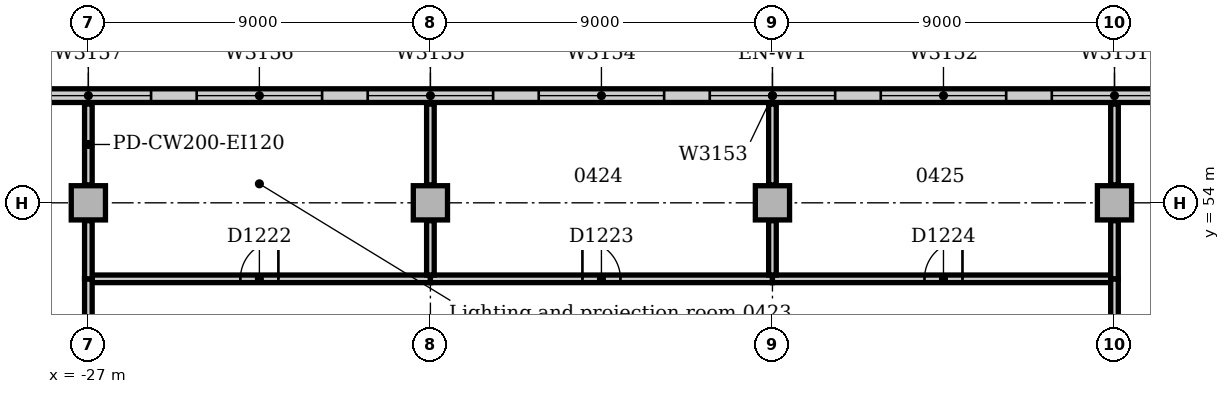
"""IFC4 building model, lengths in metres.
Left out: names, types, materials, properties, quantities, classifications, styles, units other than length and angle.
Written with IfcOpenShell. Run it as: python <this file> out.ifc"""

import sys

from ifc_helpers import new_model, si_unit, direction, frame, frame_2d, origin, origin_2d, place, context, subcontext, project, spatial, rectangle, extrude, element, fill, save


model = new_model("IFC4")
c1 = context("Model", 3, precision=1e-05, world=origin(), true_north=direction((0.0, 1.0)))
c2 = subcontext(c1, "Body", "Model", "MODEL_VIEW")
j1 = project(units=[si_unit("LENGTHUNIT", "METRE"), si_unit("PLANEANGLEUNIT", "RADIAN")], contexts=[c1])
p1 = place(None, origin())
s1 = spatial("IfcSite", under=j1, at=p1, CompositionType="ELEMENT")
p2 = place(p1, origin())
s2 = spatial("IfcBuilding", under=s1, at=p2, CompositionType="ELEMENT")
p3 = place(p2, frame((0.0, 0.0, 21.0)))
s3 = spatial("IfcBuildingStorey", under=s2, at=p3, CompositionType="ELEMENT", Elevation=21.0)
for number, where, z_axis, x_axis in (
    (1, (-27.0, 54.0, 0.0), (0.0, 0.0, 1.0), (1.0, 0.0, 0.0)),
    (2, (-18.0, 54.0, 0.0), (0.0, 0.0, 1.0), (1.0, 0.0, 0.0)),
    (3, (-9.0, 54.0, 0.0), (0.0, 0.0, 1.0), (1.0, 0.0, 0.0)),
    (4, (0.0, 54.0, 0.0), (0.0, 0.0, 1.0), (1.0, 0.0, 0.0)),
):
    element("IfcColumn", number, at=place(p3, frame(where, z_axis=z_axis, x_axis=x_axis)), inside=s3, PredefinedType="COLUMN", context=c2, shape_type="SweptSolid", body=[
        extrude(rectangle(XDim=0.9, YDim=0.9, at=origin_2d()), origin(), (0.0, 0.0, 1.0), 4.7),
    ])
p4 = place(p3, frame((63.0, 56.82, 0.0), z_axis=(0.0, 0.0, 1.0), x_axis=(-1.0, 0.0, 0.0)))
e5 = element("IfcWall", 5, at=p4, inside=s3, PredefinedType="STANDARD", context=c2, shape_type="SweptSolid", body=[
    extrude(rectangle(XDim=144.0, YDim=0.36, at=frame_2d((72.0, 0.0))), origin(), (0.0, 0.0, 1.0), 4.85),
])
p5 = place(p4, frame((2.85, 0.0, 0.9)))
e6 = element("IfcOpeningElement", 6, at=p5, cuts=e5, PredefinedType="OPENING", context=c2, shape_type="SweptSolid", body=[
    extrude(rectangle(XDim=3.3, YDim=2.4, at=frame_2d((1.65, 1.2))), frame((0.0, 0.19, 0.0), z_axis=(0.0, -1.0, 0.0), x_axis=(1.0, 0.0, 0.0)), (0.0, 0.0, 1.0), 0.38),
])
p6 = place(p4, frame((7.35, 0.0, 0.9)))
e7 = element("IfcOpeningElement", 7, at=p6, cuts=e5, PredefinedType="OPENING", context=c2, shape_type="SweptSolid", body=[
    extrude(rectangle(XDim=3.3, YDim=2.4, at=frame_2d((1.65, 1.2))), frame((0.0, 0.19, 0.0), z_axis=(0.0, -1.0, 0.0), x_axis=(1.0, 0.0, 0.0)), (0.0, 0.0, 1.0), 0.38),
])
p7 = place(p4, frame((11.85, 0.0, 0.9)))
e8 = element("IfcOpeningElement", 8, at=p7, cuts=e5, PredefinedType="OPENING", context=c2, shape_type="SweptSolid", body=[
    extrude(rectangle(XDim=3.3, YDim=2.4, at=frame_2d((1.65, 1.2))), frame((0.0, 0.19, 0.0), z_axis=(0.0, -1.0, 0.0), x_axis=(1.0, 0.0, 0.0)), (0.0, 0.0, 1.0), 0.38),
])
p8 = place(p4, frame((16.35, 0.0, 0.9)))
e9 = element("IfcOpeningElement", 9, at=p8, cuts=e5, PredefinedType="OPENING", context=c2, shape_type="SweptSolid", body=[
    extrude(rectangle(XDim=3.3, YDim=2.4, at=frame_2d((1.65, 1.2))), frame((0.0, 0.19, 0.0), z_axis=(0.0, -1.0, 0.0), x_axis=(1.0, 0.0, 0.0)), (0.0, 0.0, 1.0), 0.38),
])
p9 = place(p4, frame((20.85, 0.0, 0.9)))
e10 = element("IfcOpeningElement", 10, at=p9, cuts=e5, PredefinedType="OPENING", context=c2, shape_type="SweptSolid", body=[
    extrude(rectangle(XDim=3.3, YDim=2.4, at=frame_2d((1.65, 1.2))), frame((0.0, 0.19, 0.0), z_axis=(0.0, -1.0, 0.0), x_axis=(1.0, 0.0, 0.0)), (0.0, 0.0, 1.0), 0.38),
])
p10 = place(p4, frame((25.35, 0.0, 0.9)))
e11 = element("IfcOpeningElement", 11, at=p10, cuts=e5, PredefinedType="OPENING", context=c2, shape_type="SweptSolid", body=[
    extrude(rectangle(XDim=3.3, YDim=2.4, at=frame_2d((1.65, 1.2))), frame((0.0, 0.19, 0.0), z_axis=(0.0, -1.0, 0.0), x_axis=(1.0, 0.0, 0.0)), (0.0, 0.0, 1.0), 0.38),
])
p11 = place(p4, frame((29.85, 0.0, 0.9)))
e12 = element("IfcOpeningElement", 12, at=p11, cuts=e5, PredefinedType="OPENING", context=c2, shape_type="SweptSolid", body=[
    extrude(rectangle(XDim=3.3, YDim=2.4, at=frame_2d((1.65, 1.2))), frame((0.0, 0.19, 0.0), z_axis=(0.0, -1.0, 0.0), x_axis=(1.0, 0.0, 0.0)), (0.0, 0.0, 1.0), 0.38),
])
p12 = place(p4, frame((34.35, 0.0, 0.9)))
e13 = element("IfcOpeningElement", 13, at=p12, cuts=e5, PredefinedType="OPENING", context=c2, shape_type="SweptSolid", body=[
    extrude(rectangle(XDim=3.3, YDim=2.4, at=frame_2d((1.65, 1.2))), frame((0.0, 0.19, 0.0), z_axis=(0.0, -1.0, 0.0), x_axis=(1.0, 0.0, 0.0)), (0.0, 0.0, 1.0), 0.38),
])
p13 = place(p4, frame((38.85, 0.0, 0.9)))
e14 = element("IfcOpeningElement", 14, at=p13, cuts=e5, PredefinedType="OPENING", context=c2, shape_type="SweptSolid", body=[
    extrude(rectangle(XDim=3.3, YDim=2.4, at=frame_2d((1.65, 1.2))), frame((0.0, 0.19, 0.0), z_axis=(0.0, -1.0, 0.0), x_axis=(1.0, 0.0, 0.0)), (0.0, 0.0, 1.0), 0.38),
])
p14 = place(p4, frame((43.35, 0.0, 0.9)))
e15 = element("IfcOpeningElement", 15, at=p14, cuts=e5, PredefinedType="OPENING", context=c2, shape_type="SweptSolid", body=[
    extrude(rectangle(XDim=3.3, YDim=2.4, at=frame_2d((1.65, 1.2))), frame((0.0, 0.19, 0.0), z_axis=(0.0, -1.0, 0.0), x_axis=(1.0, 0.0, 0.0)), (0.0, 0.0, 1.0), 0.38),
])
p15 = place(p4, frame((47.85, 0.0, 0.9)))
e16 = element("IfcOpeningElement", 16, at=p15, cuts=e5, PredefinedType="OPENING", context=c2, shape_type="SweptSolid", body=[
    extrude(rectangle(XDim=3.3, YDim=2.4, at=frame_2d((1.65, 1.2))), frame((0.0, 0.19, 0.0), z_axis=(0.0, -1.0, 0.0), x_axis=(1.0, 0.0, 0.0)), (0.0, 0.0, 1.0), 0.38),
])
p16 = place(p4, frame((52.35, 0.0, 0.9)))
e17 = element("IfcOpeningElement", 17, at=p16, cuts=e5, PredefinedType="OPENING", context=c2, shape_type="SweptSolid", body=[
    extrude(rectangle(XDim=3.3, YDim=2.4, at=frame_2d((1.65, 1.2))), frame((0.0, 0.19, 0.0), z_axis=(0.0, -1.0, 0.0), x_axis=(1.0, 0.0, 0.0)), (0.0, 0.0, 1.0), 0.38),
])
p17 = place(p4, frame((56.85, 0.0, 0.9)))
e18 = element("IfcOpeningElement", 18, at=p17, cuts=e5, PredefinedType="OPENING", context=c2, shape_type="SweptSolid", body=[
    extrude(rectangle(XDim=3.3, YDim=2.4, at=frame_2d((1.65, 1.2))), frame((0.0, 0.19, 0.0), z_axis=(0.0, -1.0, 0.0), x_axis=(1.0, 0.0, 0.0)), (0.0, 0.0, 1.0), 0.38),
])
p18 = place(p4, frame((61.35, 0.0, 0.9)))
e19 = element("IfcOpeningElement", 19, at=p18, cuts=e5, PredefinedType="OPENING", context=c2, shape_type="SweptSolid", body=[
    extrude(rectangle(XDim=3.3, YDim=2.4, at=frame_2d((1.65, 1.2))), frame((0.0, 0.19, 0.0), z_axis=(0.0, -1.0, 0.0), x_axis=(1.0, 0.0, 0.0)), (0.0, 0.0, 1.0), 0.38),
])
p19 = place(p4, frame((65.85, 0.0, 0.9)))
e20 = element("IfcOpeningElement", 20, at=p19, cuts=e5, PredefinedType="OPENING", context=c2, shape_type="SweptSolid", body=[
    extrude(rectangle(XDim=3.3, YDim=2.4, at=frame_2d((1.65, 1.2))), frame((0.0, 0.19, 0.0), z_axis=(0.0, -1.0, 0.0), x_axis=(1.0, 0.0, 0.0)), (0.0, 0.0, 1.0), 0.38),
])
p20 = place(p4, frame((70.35, 0.0, 0.9)))
e21 = element("IfcOpeningElement", 21, at=p20, cuts=e5, PredefinedType="OPENING", context=c2, shape_type="SweptSolid", body=[
    extrude(rectangle(XDim=3.3, YDim=2.4, at=frame_2d((1.65, 1.2))), frame((0.0, 0.19, 0.0), z_axis=(0.0, -1.0, 0.0), x_axis=(1.0, 0.0, 0.0)), (0.0, 0.0, 1.0), 0.38),
])
p21 = place(p4, frame((74.85, 0.0, 0.9)))
e22 = element("IfcOpeningElement", 22, at=p21, cuts=e5, PredefinedType="OPENING", context=c2, shape_type="SweptSolid", body=[
    extrude(rectangle(XDim=3.3, YDim=2.4, at=frame_2d((1.65, 1.2))), frame((0.0, 0.19, 0.0), z_axis=(0.0, -1.0, 0.0), x_axis=(1.0, 0.0, 0.0)), (0.0, 0.0, 1.0), 0.38),
])
p22 = place(p4, frame((79.35, 0.0, 0.9)))
e23 = element("IfcOpeningElement", 23, at=p22, cuts=e5, PredefinedType="OPENING", context=c2, shape_type="SweptSolid", body=[
    extrude(rectangle(XDim=3.3, YDim=2.4, at=frame_2d((1.65, 1.2))), frame((0.0, 0.19, 0.0), z_axis=(0.0, -1.0, 0.0), x_axis=(1.0, 0.0, 0.0)), (0.0, 0.0, 1.0), 0.38),
])
p23 = place(p4, frame((83.85, 0.0, 0.9)))
e24 = element("IfcOpeningElement", 24, at=p23, cuts=e5, PredefinedType="OPENING", context=c2, shape_type="SweptSolid", body=[
    extrude(rectangle(XDim=3.3, YDim=2.4, at=frame_2d((1.65, 1.2))), frame((0.0, 0.19, 0.0), z_axis=(0.0, -1.0, 0.0), x_axis=(1.0, 0.0, 0.0)), (0.0, 0.0, 1.0), 0.38),
])
p24 = place(p4, frame((88.35, 0.0, 0.9)))
e25 = element("IfcOpeningElement", 25, at=p24, cuts=e5, PredefinedType="OPENING", context=c2, shape_type="SweptSolid", body=[
    extrude(rectangle(XDim=3.3, YDim=2.4, at=frame_2d((1.65, 1.2))), frame((0.0, 0.19, 0.0), z_axis=(0.0, -1.0, 0.0), x_axis=(1.0, 0.0, 0.0)), (0.0, 0.0, 1.0), 0.38),
])
p25 = place(p4, frame((92.85, 0.0, 0.9)))
e26 = element("IfcOpeningElement", 26, at=p25, cuts=e5, PredefinedType="OPENING", context=c2, shape_type="SweptSolid", body=[
    extrude(rectangle(XDim=3.3, YDim=2.4, at=frame_2d((1.65, 1.2))), frame((0.0, 0.19, 0.0), z_axis=(0.0, -1.0, 0.0), x_axis=(1.0, 0.0, 0.0)), (0.0, 0.0, 1.0), 0.38),
])
p26 = place(p4, frame((97.35, 0.0, 0.9)))
e27 = element("IfcOpeningElement", 27, at=p26, cuts=e5, PredefinedType="OPENING", context=c2, shape_type="SweptSolid", body=[
    extrude(rectangle(XDim=3.3, YDim=2.4, at=frame_2d((1.65, 1.2))), frame((0.0, 0.19, 0.0), z_axis=(0.0, -1.0, 0.0), x_axis=(1.0, 0.0, 0.0)), (0.0, 0.0, 1.0), 0.38),
])
p27 = place(p4, frame((101.85, 0.0, 0.9)))
e28 = element("IfcOpeningElement", 28, at=p27, cuts=e5, PredefinedType="OPENING", context=c2, shape_type="SweptSolid", body=[
    extrude(rectangle(XDim=3.3, YDim=2.4, at=frame_2d((1.65, 1.2))), frame((0.0, 0.19, 0.0), z_axis=(0.0, -1.0, 0.0), x_axis=(1.0, 0.0, 0.0)), (0.0, 0.0, 1.0), 0.38),
])
p28 = place(p4, frame((106.35, 0.0, 0.9)))
e29 = element("IfcOpeningElement", 29, at=p28, cuts=e5, PredefinedType="OPENING", context=c2, shape_type="SweptSolid", body=[
    extrude(rectangle(XDim=3.3, YDim=2.4, at=frame_2d((1.65, 1.2))), frame((0.0, 0.19, 0.0), z_axis=(0.0, -1.0, 0.0), x_axis=(1.0, 0.0, 0.0)), (0.0, 0.0, 1.0), 0.38),
])
p29 = place(p4, frame((110.85, 0.0, 0.9)))
e30 = element("IfcOpeningElement", 30, at=p29, cuts=e5, PredefinedType="OPENING", context=c2, shape_type="SweptSolid", body=[
    extrude(rectangle(XDim=3.3, YDim=2.4, at=frame_2d((1.65, 1.2))), frame((0.0, 0.19, 0.0), z_axis=(0.0, -1.0, 0.0), x_axis=(1.0, 0.0, 0.0)), (0.0, 0.0, 1.0), 0.38),
])
p30 = place(p4, frame((115.35, 0.0, 0.9)))
e31 = element("IfcOpeningElement", 31, at=p30, cuts=e5, PredefinedType="OPENING", context=c2, shape_type="SweptSolid", body=[
    extrude(rectangle(XDim=3.3, YDim=2.4, at=frame_2d((1.65, 1.2))), frame((0.0, 0.19, 0.0), z_axis=(0.0, -1.0, 0.0), x_axis=(1.0, 0.0, 0.0)), (0.0, 0.0, 1.0), 0.38),
])
p31 = place(p4, frame((119.85, 0.0, 0.9)))
e32 = element("IfcOpeningElement", 32, at=p31, cuts=e5, PredefinedType="OPENING", context=c2, shape_type="SweptSolid", body=[
    extrude(rectangle(XDim=3.3, YDim=2.4, at=frame_2d((1.65, 1.2))), frame((0.0, 0.19, 0.0), z_axis=(0.0, -1.0, 0.0), x_axis=(1.0, 0.0, 0.0)), (0.0, 0.0, 1.0), 0.38),
])
p32 = place(p4, frame((124.35, 0.0, 0.9)))
e33 = element("IfcOpeningElement", 33, at=p32, cuts=e5, PredefinedType="OPENING", context=c2, shape_type="SweptSolid", body=[
    extrude(rectangle(XDim=3.3, YDim=2.4, at=frame_2d((1.65, 1.2))), frame((0.0, 0.19, 0.0), z_axis=(0.0, -1.0, 0.0), x_axis=(1.0, 0.0, 0.0)), (0.0, 0.0, 1.0), 0.38),
])
p33 = place(p4, frame((128.85, 0.0, 0.9)))
e34 = element("IfcOpeningElement", 34, at=p33, cuts=e5, PredefinedType="OPENING", context=c2, shape_type="SweptSolid", body=[
    extrude(rectangle(XDim=3.3, YDim=2.4, at=frame_2d((1.65, 1.2))), frame((0.0, 0.19, 0.0), z_axis=(0.0, -1.0, 0.0), x_axis=(1.0, 0.0, 0.0)), (0.0, 0.0, 1.0), 0.38),
])
p34 = place(p4, frame((133.35, 0.0, 0.9)))
e35 = element("IfcOpeningElement", 35, at=p34, cuts=e5, PredefinedType="OPENING", context=c2, shape_type="SweptSolid", body=[
    extrude(rectangle(XDim=3.3, YDim=2.4, at=frame_2d((1.65, 1.2))), frame((0.0, 0.19, 0.0), z_axis=(0.0, -1.0, 0.0), x_axis=(1.0, 0.0, 0.0)), (0.0, 0.0, 1.0), 0.38),
])
p35 = place(p4, frame((137.85, 0.0, 0.9)))
e36 = element("IfcOpeningElement", 36, at=p35, cuts=e5, PredefinedType="OPENING", context=c2, shape_type="SweptSolid", body=[
    extrude(rectangle(XDim=3.3, YDim=2.4, at=frame_2d((1.65, 1.2))), frame((0.0, 0.19, 0.0), z_axis=(0.0, -1.0, 0.0), x_axis=(1.0, 0.0, 0.0)), (0.0, 0.0, 1.0), 0.38),
])
p36 = place(p3, frame((-26.9, 52.0, 0.0), z_axis=(0.0, 0.0, 1.0), x_axis=(1.0, 0.0, 0.0)))
e37 = element("IfcWall", 37, at=p36, inside=s3, PredefinedType="PARTITIONING", context=c2, shape_type="SweptSolid", body=[
    extrude(rectangle(XDim=8.9, YDim=0.2, at=frame_2d((4.45, 0.0))), origin(), (0.0, 0.0, 1.0), 4.7),
])
p37 = place(p36, frame((3.9, 0.0, 0.0)))
e38 = element("IfcOpeningElement", 38, at=p37, cuts=e37, PredefinedType="OPENING", context=c2, shape_type="SweptSolid", body=[
    extrude(rectangle(XDim=1.0, YDim=2.1, at=frame_2d((0.5, 1.05))), frame((0.0, 0.11, 0.0), z_axis=(0.0, -1.0, 0.0), x_axis=(1.0, 0.0, 0.0)), (0.0, 0.0, 1.0), 0.22),
])
p38 = place(p3, frame((-18.0, 52.0, 0.0), z_axis=(0.0, 0.0, 1.0), x_axis=(1.0, 0.0, 0.0)))
e39 = element("IfcWall", 39, at=p38, inside=s3, PredefinedType="PARTITIONING", context=c2, shape_type="SweptSolid", body=[
    extrude(rectangle(XDim=9.0, YDim=0.2, at=frame_2d((4.5, 0.0))), origin(), (0.0, 0.0, 1.0), 4.7),
])
p39 = place(p38, frame((4.0, 0.0, 0.0)))
e40 = element("IfcOpeningElement", 40, at=p39, cuts=e39, PredefinedType="OPENING", context=c2, shape_type="SweptSolid", body=[
    extrude(rectangle(XDim=1.0, YDim=2.1, at=frame_2d((0.5, 1.05))), frame((0.0, 0.11, 0.0), z_axis=(0.0, -1.0, 0.0), x_axis=(1.0, 0.0, 0.0)), (0.0, 0.0, 1.0), 0.22),
])
p40 = place(p3, frame((-9.0, 52.0, 0.0), z_axis=(0.0, 0.0, 1.0), x_axis=(1.0, 0.0, 0.0)))
e41 = element("IfcWall", 41, at=p40, inside=s3, PredefinedType="PARTITIONING", context=c2, shape_type="SweptSolid", body=[
    extrude(rectangle(XDim=8.9, YDim=0.2, at=frame_2d((4.45, 0.0))), origin(), (0.0, 0.0, 1.0), 4.7),
])
p41 = place(p40, frame((4.0, 0.0, 0.0)))
e42 = element("IfcOpeningElement", 42, at=p41, cuts=e41, PredefinedType="OPENING", context=c2, shape_type="SweptSolid", body=[
    extrude(rectangle(XDim=1.0, YDim=2.1, at=frame_2d((0.5, 1.05))), frame((0.0, 0.11, 0.0), z_axis=(0.0, -1.0, 0.0), x_axis=(1.0, 0.0, 0.0)), (0.0, 0.0, 1.0), 0.22),
])
for number, where, z_axis, x_axis in (
    (43, (-27.0, 46.0, 0.0), (0.0, 0.0, 1.0), (0.0, 1.0, 0.0)),
    (44, (0.0, 46.0, 0.0), (0.0, 0.0, 1.0), (0.0, 1.0, 0.0)),
):
    element("IfcWall", number, at=place(p3, frame(where, z_axis=z_axis, x_axis=x_axis)), inside=s3, PredefinedType="PARTITIONING", context=c2, shape_type="SweptSolid", body=[
        extrude(rectangle(XDim=6.0, YDim=0.2, at=frame_2d((3.0, 0.0))), origin(), (0.0, 0.0, 1.0), 4.7),
    ])
p42 = place(p3, frame((-18.0, 52.1, 0.0), z_axis=(0.0, 0.0, 1.0), x_axis=(0.0, 1.0, 0.0)))
e45 = element("IfcWall", 45, at=p42, inside=s3, PredefinedType="PARTITIONING", context=c2, shape_type="SweptSolid", body=[
    extrude(rectangle(XDim=1.43, YDim=0.2, at=frame_2d((0.715, 0.0))), origin(), (0.0, 0.0, 1.0), 4.7),
])
p43 = place(p3, frame((-18.0, 54.47, 0.0), z_axis=(0.0, 0.0, 1.0), x_axis=(0.0, 1.0, 0.0)))
e46 = element("IfcWall", 46, at=p43, inside=s3, PredefinedType="PARTITIONING", context=c2, shape_type="SweptSolid", body=[
    extrude(rectangle(XDim=2.13, YDim=0.2, at=frame_2d((1.065, 0.0))), origin(), (0.0, 0.0, 1.0), 4.7),
])
p44 = place(p3, frame((-27.0, 52.0, 0.0), z_axis=(0.0, 0.0, 1.0), x_axis=(0.0, 1.0, 0.0)))
e47 = element("IfcWall", 47, at=p44, inside=s3, PredefinedType="PARTITIONING", context=c2, shape_type="SweptSolid", body=[
    extrude(rectangle(XDim=1.53, YDim=0.2, at=frame_2d((0.765, 0.0))), origin(), (0.0, 0.0, 1.0), 4.7),
])
p45 = place(p3, frame((-27.0, 54.47, 0.0), z_axis=(0.0, 0.0, 1.0), x_axis=(0.0, 1.0, 0.0)))
e48 = element("IfcWall", 48, at=p45, inside=s3, PredefinedType="PARTITIONING", context=c2, shape_type="SweptSolid", body=[
    extrude(rectangle(XDim=2.13, YDim=0.2, at=frame_2d((1.065, 0.0))), origin(), (0.0, 0.0, 1.0), 4.7),
])
p46 = place(p3, frame((-9.0, 52.1, 0.0), z_axis=(0.0, 0.0, 1.0), x_axis=(0.0, 1.0, 0.0)))
e49 = element("IfcWall", 49, at=p46, inside=s3, PredefinedType="PARTITIONING", context=c2, shape_type="SweptSolid", body=[
    extrude(rectangle(XDim=1.43, YDim=0.2, at=frame_2d((0.715, 0.0))), origin(), (0.0, 0.0, 1.0), 4.7),
])
p47 = place(p3, frame((-9.0, 54.47, 0.0), z_axis=(0.0, 0.0, 1.0), x_axis=(0.0, 1.0, 0.0)))
e50 = element("IfcWall", 50, at=p47, inside=s3, PredefinedType="PARTITIONING", context=c2, shape_type="SweptSolid", body=[
    extrude(rectangle(XDim=2.13, YDim=0.2, at=frame_2d((1.065, 0.0))), origin(), (0.0, 0.0, 1.0), 4.7),
])
p48 = place(p3, frame((0.0, 52.0, 0.0), z_axis=(0.0, 0.0, 1.0), x_axis=(0.0, 1.0, 0.0)))
e51 = element("IfcWall", 51, at=p48, inside=s3, PredefinedType="PARTITIONING", context=c2, shape_type="SweptSolid", body=[
    extrude(rectangle(XDim=1.53, YDim=0.2, at=frame_2d((0.765, 0.0))), origin(), (0.0, 0.0, 1.0), 4.7),
])
p49 = place(p3, frame((0.0, 54.47, 0.0), z_axis=(0.0, 0.0, 1.0), x_axis=(0.0, 1.0, 0.0)))
e52 = element("IfcWall", 52, at=p49, inside=s3, PredefinedType="PARTITIONING", context=c2, shape_type="SweptSolid", body=[
    extrude(rectangle(XDim=2.13, YDim=0.2, at=frame_2d((1.065, 0.0))), origin(), (0.0, 0.0, 1.0), 4.7),
])
p50 = place(p18, origin())
e53 = element("IfcWindow", 53, at=p50, inside=s3, PartitioningType="SINGLE_PANEL", PredefinedType="WINDOW", context=c2, shape_type="SweptSolid", body=[
    extrude(rectangle(XDim=3.3, YDim=2.4, at=frame_2d((1.65, 1.2))), frame((0.0, 0.13, 0.0), z_axis=(0.0, -1.0, 0.0), x_axis=(1.0, 0.0, 0.0)), (0.0, 0.0, 1.0), 0.06),
])
fill(e19, e53)
p51 = place(p19, origin())
e54 = element("IfcWindow", 54, at=p51, inside=s3, PartitioningType="SINGLE_PANEL", PredefinedType="WINDOW", context=c2, shape_type="SweptSolid", body=[
    extrude(rectangle(XDim=3.3, YDim=2.4, at=frame_2d((1.65, 1.2))), frame((0.0, 0.13, 0.0), z_axis=(0.0, -1.0, 0.0), x_axis=(1.0, 0.0, 0.0)), (0.0, 0.0, 1.0), 0.06),
])
fill(e20, e54)
p52 = place(p20, origin())
e55 = element("IfcWindow", 55, at=p52, inside=s3, PartitioningType="SINGLE_PANEL", PredefinedType="WINDOW", context=c2, shape_type="SweptSolid", body=[
    extrude(rectangle(XDim=3.3, YDim=2.4, at=frame_2d((1.65, 1.2))), frame((0.0, 0.13, 0.0), z_axis=(0.0, -1.0, 0.0), x_axis=(1.0, 0.0, 0.0)), (0.0, 0.0, 1.0), 0.06),
])
fill(e21, e55)
p53 = place(p21, origin())
e56 = element("IfcWindow", 56, at=p53, inside=s3, PartitioningType="SINGLE_PANEL", PredefinedType="WINDOW", context=c2, shape_type="SweptSolid", body=[
    extrude(rectangle(XDim=3.3, YDim=2.4, at=frame_2d((1.65, 1.2))), frame((0.0, 0.13, 0.0), z_axis=(0.0, -1.0, 0.0), x_axis=(1.0, 0.0, 0.0)), (0.0, 0.0, 1.0), 0.06),
])
fill(e22, e56)
p54 = place(p22, origin())
e57 = element("IfcWindow", 57, at=p54, inside=s3, PartitioningType="SINGLE_PANEL", PredefinedType="WINDOW", context=c2, shape_type="SweptSolid", body=[
    extrude(rectangle(XDim=3.3, YDim=2.4, at=frame_2d((1.65, 1.2))), frame((0.0, 0.13, 0.0), z_axis=(0.0, -1.0, 0.0), x_axis=(1.0, 0.0, 0.0)), (0.0, 0.0, 1.0), 0.06),
])
fill(e23, e57)
p55 = place(p23, origin())
e58 = element("IfcWindow", 58, at=p55, inside=s3, PartitioningType="SINGLE_PANEL", PredefinedType="WINDOW", context=c2, shape_type="SweptSolid", body=[
    extrude(rectangle(XDim=3.3, YDim=2.4, at=frame_2d((1.65, 1.2))), frame((0.0, 0.13, 0.0), z_axis=(0.0, -1.0, 0.0), x_axis=(1.0, 0.0, 0.0)), (0.0, 0.0, 1.0), 0.06),
])
fill(e24, e58)
p56 = place(p24, origin())
e59 = element("IfcWindow", 59, at=p56, inside=s3, PartitioningType="SINGLE_PANEL", PredefinedType="WINDOW", context=c2, shape_type="SweptSolid", body=[
    extrude(rectangle(XDim=3.3, YDim=2.4, at=frame_2d((1.65, 1.2))), frame((0.0, 0.13, 0.0), z_axis=(0.0, -1.0, 0.0), x_axis=(1.0, 0.0, 0.0)), (0.0, 0.0, 1.0), 0.06),
])
fill(e25, e59)
p57 = place(p37, origin())
e60 = element("IfcDoor", 60, at=p57, inside=s3, OperationType="SINGLE_SWING_RIGHT", PredefinedType="DOOR", context=c2, shape_type="SweptSolid", body=[
    extrude(rectangle(XDim=1.0, YDim=2.1, at=frame_2d((0.5, 1.05))), frame((0.0, 0.025, 0.0), z_axis=(0.0, -1.0, 0.0), x_axis=(1.0, 0.0, 0.0)), (0.0, 0.0, 1.0), 0.05),
])
fill(e38, e60)
p58 = place(p39, origin())
e61 = element("IfcDoor", 61, at=p58, inside=s3, OperationType="SINGLE_SWING_LEFT", PredefinedType="DOOR", context=c2, shape_type="SweptSolid", body=[
    extrude(rectangle(XDim=1.0, YDim=2.1, at=frame_2d((0.5, 1.05))), frame((0.0, 0.025, 0.0), z_axis=(0.0, -1.0, 0.0), x_axis=(1.0, 0.0, 0.0)), (0.0, 0.0, 1.0), 0.05),
])
fill(e40, e61)
p59 = place(p41, origin())
e62 = element("IfcDoor", 62, at=p59, inside=s3, OperationType="SINGLE_SWING_RIGHT", PredefinedType="DOOR", context=c2, shape_type="SweptSolid", body=[
    extrude(rectangle(XDim=1.0, YDim=2.1, at=frame_2d((0.5, 1.05))), frame((0.0, 0.025, 0.0), z_axis=(0.0, -1.0, 0.0), x_axis=(1.0, 0.0, 0.0)), (0.0, 0.0, 1.0), 0.05),
])
fill(e42, e62)
save(model, sys.argv[1])
